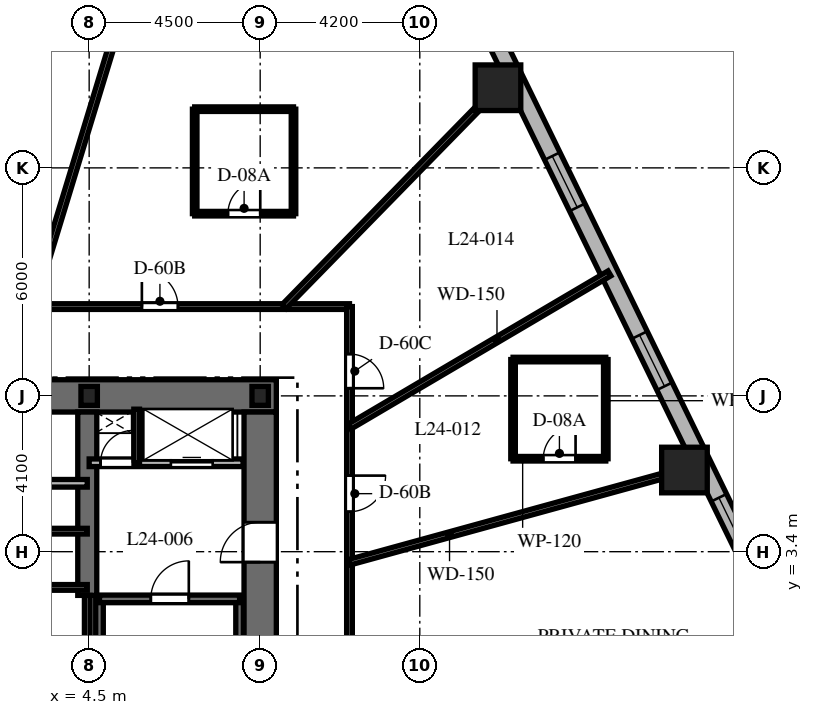
"""IFC4 building model, lengths in metres.
Left out: names, types, materials, properties, quantities, classifications, styles, units other than length and angle.
Written with IfcOpenShell. Run it as: python <this file> out.ifc"""

import sys

from ifc_helpers import new_model, si_unit, direction, frame, frame_2d, origin, origin_2d, place, context, subcontext, project, spatial, rectangle, i_section, extrude, element, fill, save


model = new_model("IFC4")
c1 = context("Model", 3, precision=1e-05, world=origin(), true_north=direction((0.0, 1.0)))
c2 = subcontext(c1, "Body", "Model", "MODEL_VIEW")
j1 = project(units=[si_unit("LENGTHUNIT", "METRE"), si_unit("PLANEANGLEUNIT", "RADIAN")], contexts=[c1])
p1 = place(None, origin())
s1 = spatial("IfcSite", under=j1, at=p1, CompositionType="ELEMENT")
p2 = place(p1, origin())
s2 = spatial("IfcBuilding", under=s1, at=p2, CompositionType="ELEMENT")
p3 = place(p2, frame((0.0, 0.0, 102.5)))
s3 = spatial("IfcBuildingStorey", under=s2, at=p3, CompositionType="ELEMENT", Elevation=102.5)
p4 = place(p3, frame((1.85, 7.5, 0.0), z_axis=(0.0, 0.0, 1.0), x_axis=(1.0, 0.0, 0.0)))
e1 = element("IfcWall", 1, at=p4, inside=s3, PredefinedType="SHEAR", context=c2, shape_type="SweptSolid", body=[
    extrude(rectangle(XDim=7.575, YDim=0.85, at=frame_2d((3.788, 0.0))), origin(), (0.0, 0.0, 1.0), 3.7),
])
p5 = place(p3, frame((9.0, -7.075, 0.0), z_axis=(0.0, 0.0, 1.0), x_axis=(0.0, 1.0, 0.0)))
e2 = element("IfcWall", 2, at=p5, inside=s3, PredefinedType="SHEAR", context=c2, shape_type="SweptSolid", body=[
    extrude(rectangle(XDim=14.15, YDim=0.85, at=frame_2d((7.075, 0.0))), origin(), (0.0, 0.0, 1.0), 3.7),
])
p6 = place(p5, frame((10.2, 0.0, 0.0)))
e3 = element("IfcOpeningElement", 3, at=p6, cuts=e2, PredefinedType="OPENING", context=c2, shape_type="SweptSolid", body=[
    extrude(rectangle(XDim=1.05, YDim=2.15, at=frame_2d((0.525, 1.075))), frame((0.0, 0.435, 0.0), z_axis=(0.0, -1.0, 0.0), x_axis=(1.0, 0.0, 0.0)), (0.0, 0.0, 1.0), 0.87),
])
p7 = place(p3, frame((4.45, 2.25, 0.0), z_axis=(0.0, 0.0, 1.0), x_axis=(0.0, 1.0, 0.0)))
e4 = element("IfcWall", 4, at=p7, inside=s3, PredefinedType="SHEAR", context=c2, shape_type="SweptSolid", body=[
    extrude(rectangle(XDim=4.825, YDim=0.5, at=frame_2d((2.413, 0.0))), origin(), (0.0, 0.0, 1.0), 3.7),
])
for number, where, z_axis, x_axis in (
    (5, (4.772, -6.985, 0.0), (0.0, 0.0, 1.0), (0.0, 1.0, 0.0)),
    (6, (8.458, -6.985, 0.0), (0.0, 0.0, 1.0), (0.0, 1.0, 0.0)),
):
    element("IfcWall", number, at=place(p3, frame(where, z_axis=z_axis, x_axis=x_axis)), inside=s3, PredefinedType="SHEAR", context=c2, shape_type="SweptSolid", body=[
        extrude(rectangle(XDim=9.143, YDim=0.2, at=frame_2d((4.572, 0.0))), origin(), (0.0, 0.0, 1.0), 3.7),
    ])
p8 = place(p3, frame((4.772, 2.158, 0.0), z_axis=(0.0, 0.0, 1.0), x_axis=(1.0, 0.0, 0.0)))
e7 = element("IfcWall", 7, at=p8, inside=s3, PredefinedType="SHEAR", context=c2, shape_type="SweptSolid", body=[
    extrude(rectangle(XDim=3.686, YDim=0.2, at=frame_2d((1.843, 0.0))), origin(), (0.0, 0.0, 1.0), 3.7),
])
p9 = place(p8, frame((1.35, 0.0, 0.0)))
e8 = element("IfcOpeningElement", 8, at=p9, cuts=e7, PredefinedType="OPENING", context=c2, shape_type="SweptSolid", body=[
    extrude(rectangle(XDim=1.0, YDim=2.15, at=frame_2d((0.5, 1.075))), frame((0.0, 0.11, 0.0), z_axis=(0.0, -1.0, 0.0), x_axis=(1.0, 0.0, 0.0)), (0.0, 0.0, 1.0), 0.22),
])
for number, where, z_axis, x_axis in (
    (9, (9.0, 7.5, 0.0), (0.0, 0.0, 1.0), (1.0, 0.0, 0.0)),
    (10, (4.5, 7.5, 0.0), (0.0, 0.0, 1.0), (1.0, 0.0, 0.0)),
):
    element("IfcColumn", number, at=place(p3, frame(where, z_axis=z_axis, x_axis=x_axis)), inside=s3, PredefinedType="COLUMN", context=c2, shape_type="SweptSolid", body=[
        extrude(i_section(OverallWidth=0.432, OverallDepth=0.498, WebThickness=0.056, FlangeThickness=0.089, at=origin_2d()), origin(), (0.0, 0.0, 1.0), 3.7),
    ])
for number, where, z_axis, x_axis in (
    (11, (20.164, 5.549, 0.0), (0.0, 0.0, 1.0), (1.0, 0.0, 0.0)),
    (12, (15.257, 15.609, 0.0), (0.0, 0.0, 1.0), (1.0, 0.0, 0.0)),
):
    element("IfcColumn", number, at=place(p3, frame(where, z_axis=z_axis, x_axis=x_axis)), inside=s3, PredefinedType="COLUMN", context=c2, shape_type="SweptSolid", body=[
        extrude(rectangle(XDim=1.2, YDim=1.2, at=origin_2d()), origin(), (0.0, 0.0, 1.0), 3.7),
    ])
p10 = place(p3, frame((22.238, 2.427, 0.0), z_axis=(0.0, 0.0, 1.0), x_axis=(-0.438374803278, 0.898792262901, 0.0)))
e13 = element("IfcWall", 13, at=p10, inside=s3, PredefinedType="SOLIDWALL", context=c2, shape_type="SweptSolid", body=[
    extrude(rectangle(XDim=18.618, YDim=0.45, at=frame_2d((9.309, 0.0))), origin(), (0.0, 0.0, 1.0), 3.4),
])
p11 = place(p10, frame((5.926, 0.0, 0.8)))
e14 = element("IfcOpeningElement", 14, at=p11, cuts=e13, PredefinedType="OPENING", context=c2, shape_type="SweptSolid", body=[
    extrude(rectangle(XDim=1.5, YDim=1.8, at=frame_2d((0.75, 0.9))), frame((0.0, 0.235, 0.0), z_axis=(0.0, -1.0, 0.0), x_axis=(1.0, 0.0, 0.0)), (0.0, 0.0, 1.0), 0.47),
])
p12 = place(p10, frame((11.165, 0.0, 0.8)))
e15 = element("IfcOpeningElement", 15, at=p12, cuts=e13, PredefinedType="OPENING", context=c2, shape_type="SweptSolid", body=[
    extrude(rectangle(XDim=1.5, YDim=1.8, at=frame_2d((0.75, 0.9))), frame((0.0, 0.235, 0.0), z_axis=(0.0, -1.0, 0.0), x_axis=(1.0, 0.0, 0.0)), (0.0, 0.0, 1.0), 0.47),
])
p13 = place(p10, frame((16.006, 0.0, 0.8)))
e16 = element("IfcOpeningElement", 16, at=p13, cuts=e13, PredefinedType="OPENING", context=c2, shape_type="SweptSolid", body=[
    extrude(rectangle(XDim=1.5, YDim=1.8, at=frame_2d((0.75, 0.9))), frame((0.0, 0.235, 0.0), z_axis=(0.0, -1.0, 0.0), x_axis=(1.0, 0.0, 0.0)), (0.0, 0.0, 1.0), 0.47),
])
p14 = place(p10, frame((1.163, 0.0, 0.8)))
e17 = element("IfcOpeningElement", 17, at=p14, cuts=e13, PredefinedType="OPENING", context=c2, shape_type="SweptSolid", body=[
    extrude(rectangle(XDim=1.5, YDim=1.8, at=frame_2d((0.75, 0.9))), frame((0.0, 0.235, 0.0), z_axis=(0.0, -1.0, 0.0), x_axis=(1.0, 0.0, 0.0)), (0.0, 0.0, 1.0), 0.47),
])
p15 = place(p3, frame((4.5, 5.74, 0.0), z_axis=(0.0, 0.0, 1.0), x_axis=(1.0, 0.0, 0.0)))
e18 = element("IfcWall", 18, at=p15, inside=s3, PredefinedType="PARTITIONING", context=c2, shape_type="SweptSolid", body=[
    extrude(rectangle(XDim=4.05, YDim=0.2, at=frame_2d((2.025, 0.0))), origin(), (0.0, 0.0, 1.0), 3.4),
])
p16 = place(p15, frame((0.3, 0.0, 0.0)))
e19 = element("IfcOpeningElement", 19, at=p16, cuts=e18, PredefinedType="OPENING", context=c2, shape_type="SweptSolid", body=[
    extrude(rectangle(XDim=0.85, YDim=2.03, at=frame_2d((0.425, 1.015))), frame((0.0, 0.11, 0.0), z_axis=(0.0, -1.0, 0.0), x_axis=(1.0, 0.0, 0.0)), (0.0, 0.0, 1.0), 0.22),
])
p17 = place(p15, frame((2.15, 0.0, 0.0)))
e20 = element("IfcOpeningElement", 20, at=p17, cuts=e18, PredefinedType="OPENING", context=c2, shape_type="SweptSolid", body=[
    extrude(rectangle(XDim=1.1, YDim=2.2, at=frame_2d((0.55, 1.1))), frame((0.0, 0.11, 0.0), z_axis=(0.0, -1.0, 0.0), x_axis=(1.0, 0.0, 0.0)), (0.0, 0.0, 1.0), 0.22),
])
p18 = place(p3, frame((5.75, 5.74, 0.0), z_axis=(0.0, 0.0, 1.0), x_axis=(0.0, 1.0, 0.0)))
e21 = element("IfcWall", 21, at=p18, inside=s3, PredefinedType="PARTITIONING", context=c2, shape_type="SweptSolid", body=[
    extrude(rectangle(XDim=1.41, YDim=0.15, at=frame_2d((0.705, 0.0))), origin(), (0.0, 0.0, 1.0), 3.4),
])
p19 = place(p3, frame((1.85, 5.2, 0.0), z_axis=(0.0, 0.0, 1.0), x_axis=(1.0, 0.0, 0.0)))
e22 = element("IfcWall", 22, at=p19, inside=s3, PredefinedType="PARTITIONING", context=c2, shape_type="SweptSolid", body=[
    extrude(rectangle(XDim=2.6, YDim=0.2, at=frame_2d((1.3, 0.0))), origin(), (0.0, 0.0, 1.0), 3.4),
])
p20 = place(p3, frame((4.45, -1.972, 0.0), z_axis=(0.0, 0.0, 1.0), x_axis=(0.0, 1.0, 0.0)))
e23 = element("IfcWall", 23, at=p20, inside=s3, PredefinedType="PARTITIONING", context=c2, shape_type="SweptSolid", body=[
    extrude(rectangle(XDim=4.222, YDim=0.15, at=frame_2d((2.111, 0.0))), origin(), (0.0, 0.0, 1.0), 3.4),
])
for number, where, z_axis, x_axis in (
    (24, (1.9, 3.94, 0.0), (0.0, 0.0, 1.0), (1.0, 0.0, 0.0)),
    (25, (1.9, 2.46, 0.0), (0.0, 0.0, 1.0), (1.0, 0.0, 0.0)),
):
    element("IfcWall", number, at=place(p3, frame(where, z_axis=z_axis, x_axis=x_axis)), inside=s3, PredefinedType="PARTITIONING", context=c2, shape_type="SweptSolid", body=[
        extrude(rectangle(XDim=2.55, YDim=0.15, at=frame_2d((1.275, 0.0))), origin(), (0.0, 0.0, 1.0), 3.4),
    ])
p21 = place(p3, frame((-11.35, 9.85, 0.0), z_axis=(0.0, 0.0, 1.0), x_axis=(1.0, 0.0, 0.0)))
e26 = element("IfcWall", 26, at=p21, inside=s3, PredefinedType="PARTITIONING", context=c2, shape_type="SweptSolid", body=[
    extrude(rectangle(XDim=22.7, YDim=0.15, at=frame_2d((11.35, 0.0))), origin(), (0.0, 0.0, 1.0), 2.84),
])
p22 = place(p21, frame((17.237, 0.0, 0.0)))
e27 = element("IfcOpeningElement", 27, at=p22, cuts=e26, PredefinedType="OPENING", context=c2, shape_type="SweptSolid", body=[
    extrude(rectangle(XDim=0.95, YDim=2.03, at=frame_2d((0.475, 1.015))), frame((0.0, 0.085, 0.0), z_axis=(0.0, -1.0, 0.0), x_axis=(1.0, 0.0, 0.0)), (0.0, 0.0, 1.0), 0.17),
])
p23 = place(p21, frame((10.45, 0.0, 0.0)))
e28 = element("IfcOpeningElement", 28, at=p23, cuts=e26, PredefinedType="OPENING", context=c2, shape_type="SweptSolid", body=[
    extrude(rectangle(XDim=0.95, YDim=2.03, at=frame_2d((0.475, 1.015))), frame((0.0, 0.085, 0.0), z_axis=(0.0, -1.0, 0.0), x_axis=(1.0, 0.0, 0.0)), (0.0, 0.0, 1.0), 0.17),
])
p24 = place(p21, frame((3.399, 0.0, 0.0)))
e29 = element("IfcOpeningElement", 29, at=p24, cuts=e26, PredefinedType="OPENING", context=c2, shape_type="SweptSolid", body=[
    extrude(rectangle(XDim=0.95, YDim=2.03, at=frame_2d((0.475, 1.015))), frame((0.0, 0.085, 0.0), z_axis=(0.0, -1.0, 0.0), x_axis=(1.0, 0.0, 0.0)), (0.0, 0.0, 1.0), 0.17),
])
p25 = place(p3, frame((11.35, 9.85, 0.0), z_axis=(0.0, 0.0, 1.0), x_axis=(0.0, -1.0, 0.0)))
e30 = element("IfcWall", 30, at=p25, inside=s3, PredefinedType="PARTITIONING", context=c2, shape_type="SweptSolid", body=[
    extrude(rectangle(XDim=19.7, YDim=0.15, at=frame_2d((9.85, 0.0))), origin(), (0.0, 0.0, 1.0), 2.84),
])
p26 = place(p25, frame((4.448, 0.0, 0.0)))
e31 = element("IfcOpeningElement", 31, at=p26, cuts=e30, PredefinedType="OPENING", context=c2, shape_type="SweptSolid", body=[
    extrude(rectangle(XDim=0.95, YDim=2.03, at=frame_2d((0.475, 1.015))), frame((0.0, 0.085, 0.0), z_axis=(0.0, -1.0, 0.0), x_axis=(1.0, 0.0, 0.0)), (0.0, 0.0, 1.0), 0.17),
])
p27 = place(p25, frame((1.249, 0.0, 0.0)))
e32 = element("IfcOpeningElement", 32, at=p27, cuts=e30, PredefinedType="OPENING", context=c2, shape_type="SweptSolid", body=[
    extrude(rectangle(XDim=0.9, YDim=2.03, at=frame_2d((0.45, 1.015))), frame((0.0, 0.085, 0.0), z_axis=(0.0, -1.0, 0.0), x_axis=(1.0, 0.0, 0.0)), (0.0, 0.0, 1.0), 0.17),
])
p28 = place(p25, frame((15.205, 0.0, 0.0)))
e33 = element("IfcOpeningElement", 33, at=p28, cuts=e30, PredefinedType="OPENING", context=c2, shape_type="SweptSolid", body=[
    extrude(rectangle(XDim=0.95, YDim=2.03, at=frame_2d((0.475, 1.015))), frame((0.0, 0.085, 0.0), z_axis=(0.0, -1.0, 0.0), x_axis=(1.0, 0.0, 0.0)), (0.0, 0.0, 1.0), 0.17),
])
p29 = place(p25, frame((8.836, 0.0, 0.0)))
e34 = element("IfcOpeningElement", 34, at=p29, cuts=e30, PredefinedType="OPENING", context=c2, shape_type="SweptSolid", body=[
    extrude(rectangle(XDim=0.95, YDim=2.03, at=frame_2d((0.475, 1.015))), frame((0.0, 0.085, 0.0), z_axis=(0.0, -1.0, 0.0), x_axis=(1.0, 0.0, 0.0)), (0.0, 0.0, 1.0), 0.17),
])
p30 = place(p3, frame((11.35, 3.123, 0.0), z_axis=(0.0, 0.0, 1.0), x_axis=(0.964151983214, 0.265350623261, 0.0)))
e35 = element("IfcWall", 35, at=p30, inside=s3, PredefinedType="PARTITIONING", context=c2, shape_type="SweptSolid", body=[
    extrude(rectangle(XDim=9.645, YDim=0.15, at=frame_2d((4.823, 0.0))), origin(), (0.0, 0.0, 1.0), 2.54),
])
p31 = place(p3, frame((11.35, 6.691, 0.0), z_axis=(0.0, 0.0, 1.0), x_axis=(0.861446954497, 0.507847560383, 0.0)))
e36 = element("IfcWall", 36, at=p31, inside=s3, PredefinedType="PARTITIONING", context=c2, shape_type="SweptSolid", body=[
    extrude(rectangle(XDim=7.941, YDim=0.15, at=frame_2d((3.97, 0.0))), origin(), (0.0, 0.0, 1.0), 2.54),
])
p32 = place(p3, frame((9.628, 9.85, 0.0), z_axis=(0.0, 0.0, 1.0), x_axis=(0.698992824326, 0.715128681805, 0.0)))
e37 = element("IfcWall", 37, at=p32, inside=s3, PredefinedType="PARTITIONING", context=c2, shape_type="SweptSolid", body=[
    extrude(rectangle(XDim=8.579, YDim=0.15, at=frame_2d((4.29, 0.0))), origin(), (0.0, 0.0, 1.0), 2.54),
])
p33 = place(p3, frame((3.0, 9.85, 0.0), z_axis=(0.0, 0.0, 1.0), x_axis=(0.291352035382, 0.95661590593, 0.0)))
e38 = element("IfcWall", 38, at=p33, inside=s3, PredefinedType="PARTITIONING", context=c2, shape_type="SweptSolid", body=[
    extrude(rectangle(XDim=11.734, YDim=0.15, at=frame_2d((5.867, 0.0))), origin(), (0.0, 0.0, 1.0), 2.54),
])
p34 = place(p3, frame((15.654, 5.846, 0.0), z_axis=(0.0, 0.0, 1.0), x_axis=(1.0, 0.0, 0.0)))
e39 = element("IfcWall", 39, at=p34, inside=s3, PredefinedType="PARTITIONING", context=c2, shape_type="SweptSolid", body=[
    extrude(rectangle(XDim=2.44, YDim=0.12, at=frame_2d((1.22, 0.0))), origin(), (0.0, 0.0, 1.0), 2.84),
])
p35 = place(p34, frame((0.795, 0.0, 0.0)))
e40 = element("IfcOpeningElement", 40, at=p35, cuts=e39, PredefinedType="OPENING", context=c2, shape_type="SweptSolid", body=[
    extrude(rectangle(XDim=0.85, YDim=2.03, at=frame_2d((0.425, 1.015))), frame((0.0, 0.07, 0.0), z_axis=(0.0, -1.0, 0.0), x_axis=(1.0, 0.0, 0.0)), (0.0, 0.0, 1.0), 0.14),
])
p36 = place(p3, frame((18.094, 5.846, 0.0), z_axis=(0.0, 0.0, 1.0), x_axis=(0.0, 1.0, 0.0)))
e41 = element("IfcWall", 41, at=p36, inside=s3, PredefinedType="PARTITIONING", context=c2, shape_type="SweptSolid", body=[
    extrude(rectangle(XDim=2.61, YDim=0.12, at=frame_2d((1.305, 0.0))), origin(), (0.0, 0.0, 1.0), 2.84),
])
p37 = place(p3, frame((18.094, 8.456, 0.0), z_axis=(0.0, 0.0, 1.0), x_axis=(-1.0, 0.0, 0.0)))
e42 = element("IfcWall", 42, at=p37, inside=s3, PredefinedType="PARTITIONING", context=c2, shape_type="SweptSolid", body=[
    extrude(rectangle(XDim=2.44, YDim=0.12, at=frame_2d((1.22, 0.0))), origin(), (0.0, 0.0, 1.0), 3.4),
])
p38 = place(p3, frame((15.654, 8.456, 0.0), z_axis=(0.0, 0.0, 1.0), x_axis=(0.0, -1.0, 0.0)))
e43 = element("IfcWall", 43, at=p38, inside=s3, PredefinedType="PARTITIONING", context=c2, shape_type="SweptSolid", body=[
    extrude(rectangle(XDim=2.61, YDim=0.12, at=frame_2d((1.305, 0.0))), origin(), (0.0, 0.0, 1.0), 2.84),
])
p39 = place(p3, frame((7.277, 12.295, 0.0), z_axis=(0.0, 0.0, 1.0), x_axis=(1.0, 0.0, 0.0)))
e44 = element("IfcWall", 44, at=p39, inside=s3, PredefinedType="PARTITIONING", context=c2, shape_type="SweptSolid", body=[
    extrude(rectangle(XDim=2.6, YDim=0.12, at=frame_2d((1.3, 0.0))), origin(), (0.0, 0.0, 1.0), 2.84),
])
p40 = place(p39, frame((0.875, 0.0, 0.0)))
e45 = element("IfcOpeningElement", 45, at=p40, cuts=e44, PredefinedType="OPENING", context=c2, shape_type="SweptSolid", body=[
    extrude(rectangle(XDim=0.85, YDim=2.03, at=frame_2d((0.425, 1.015))), frame((0.0, 0.07, 0.0), z_axis=(0.0, -1.0, 0.0), x_axis=(1.0, 0.0, 0.0)), (0.0, 0.0, 1.0), 0.14),
])
p41 = place(p3, frame((9.877, 12.295, 0.0), z_axis=(0.0, 0.0, 1.0), x_axis=(0.0, 1.0, 0.0)))
e46 = element("IfcWall", 46, at=p41, inside=s3, PredefinedType="PARTITIONING", context=c2, shape_type="SweptSolid", body=[
    extrude(rectangle(XDim=2.75, YDim=0.12, at=frame_2d((1.375, 0.0))), origin(), (0.0, 0.0, 1.0), 2.972),
])
p42 = place(p3, frame((9.877, 15.045, 0.0), z_axis=(0.0, 0.0, 1.0), x_axis=(-1.0, 0.0, 0.0)))
e47 = element("IfcWall", 47, at=p42, inside=s3, PredefinedType="PARTITIONING", context=c2, shape_type="SweptSolid", body=[
    extrude(rectangle(XDim=2.6, YDim=0.12, at=frame_2d((1.3, 0.0))), origin(), (0.0, 0.0, 1.0), 2.972),
])
p43 = place(p3, frame((7.277, 15.045, 0.0), z_axis=(0.0, 0.0, 1.0), x_axis=(0.0, -1.0, 0.0)))
e48 = element("IfcWall", 48, at=p43, inside=s3, PredefinedType="PARTITIONING", context=c2, shape_type="SweptSolid", body=[
    extrude(rectangle(XDim=2.75, YDim=0.12, at=frame_2d((1.375, 0.0))), origin(), (0.0, 0.0, 1.0), 2.84),
])
p44 = place(p11, origin())
e49 = element("IfcWindow", 49, at=p44, inside=s3, PartitioningType="SINGLE_PANEL", PredefinedType="WINDOW", context=c2, shape_type="SweptSolid", body=[
    extrude(rectangle(XDim=1.5, YDim=1.8, at=frame_2d((0.75, 0.9))), frame((0.0, 0.03, 0.0), z_axis=(0.0, -1.0, 0.0), x_axis=(1.0, 0.0, 0.0)), (0.0, 0.0, 1.0), 0.06),
])
fill(e14, e49)
p45 = place(p12, origin())
e50 = element("IfcWindow", 50, at=p45, inside=s3, PartitioningType="SINGLE_PANEL", PredefinedType="WINDOW", context=c2, shape_type="SweptSolid", body=[
    extrude(rectangle(XDim=1.5, YDim=1.8, at=frame_2d((0.75, 0.9))), frame((0.0, 0.03, 0.0), z_axis=(0.0, -1.0, 0.0), x_axis=(1.0, 0.0, 0.0)), (0.0, 0.0, 1.0), 0.06),
])
fill(e15, e50)
p46 = place(p14, origin())
e51 = element("IfcWindow", 51, at=p46, inside=s3, PartitioningType="SINGLE_PANEL", PredefinedType="WINDOW", context=c2, shape_type="SweptSolid", body=[
    extrude(rectangle(XDim=1.5, YDim=1.8, at=frame_2d((0.75, 0.9))), frame((0.0, 0.03, 0.0), z_axis=(0.0, -1.0, 0.0), x_axis=(1.0, 0.0, 0.0)), (0.0, 0.0, 1.0), 0.06),
])
fill(e17, e51)
p47 = place(p9, origin())
e52 = element("IfcDoor", 52, at=p47, inside=s3, OperationType="SINGLE_SWING_RIGHT", PredefinedType="DOOR", context=c2, shape_type="SweptSolid", body=[
    extrude(rectangle(XDim=1.0, YDim=2.15, at=frame_2d((0.5, 1.075))), frame((0.0, 0.025, 0.0), z_axis=(0.0, -1.0, 0.0), x_axis=(1.0, 0.0, 0.0)), (0.0, 0.0, 1.0), 0.05),
])
fill(e8, e52)
p48 = place(p6, origin())
e53 = element("IfcDoor", 53, at=p48, inside=s3, OperationType="SINGLE_SWING_LEFT", PredefinedType="DOOR", context=c2, shape_type="SweptSolid", body=[
    extrude(rectangle(XDim=1.05, YDim=2.15, at=frame_2d((0.525, 1.075))), frame((0.0, 0.025, 0.0), z_axis=(0.0, -1.0, 0.0), x_axis=(1.0, 0.0, 0.0)), (0.0, 0.0, 1.0), 0.05),
])
fill(e3, e53)
p49 = place(p16, origin())
e54 = element("IfcDoor", 54, at=p49, inside=s3, OperationType="SINGLE_SWING_RIGHT", PredefinedType="DOOR", context=c2, shape_type="SweptSolid", body=[
    extrude(rectangle(XDim=0.85, YDim=2.03, at=frame_2d((0.425, 1.015))), frame((0.0, 0.025, 0.0), z_axis=(0.0, -1.0, 0.0), x_axis=(1.0, 0.0, 0.0)), (0.0, 0.0, 1.0), 0.05),
])
fill(e19, e54)
p50 = place(p17, origin())
e55 = element("IfcDoor", 55, at=p50, inside=s3, OperationType="SLIDING_TO_RIGHT", PredefinedType="DOOR", context=c2, shape_type="SweptSolid", body=[
    extrude(rectangle(XDim=1.1, YDim=2.2, at=frame_2d((0.55, 1.1))), frame((0.0, 0.025, 0.0), z_axis=(0.0, -1.0, 0.0), x_axis=(1.0, 0.0, 0.0)), (0.0, 0.0, 1.0), 0.05),
])
fill(e20, e55)
p51 = place(p26, origin())
e56 = element("IfcDoor", 56, at=p51, inside=s3, OperationType="SINGLE_SWING_LEFT", PredefinedType="DOOR", context=c2, shape_type="SweptSolid", body=[
    extrude(rectangle(XDim=0.95, YDim=2.03, at=frame_2d((0.475, 1.015))), frame((0.0, 0.025, 0.0), z_axis=(0.0, -1.0, 0.0), x_axis=(1.0, 0.0, 0.0)), (0.0, 0.0, 1.0), 0.05),
])
fill(e31, e56)
p52 = place(p35, origin())
e57 = element("IfcDoor", 57, at=p52, inside=s3, OperationType="SINGLE_SWING_RIGHT", PredefinedType="DOOR", context=c2, shape_type="SweptSolid", body=[
    extrude(rectangle(XDim=0.85, YDim=2.03, at=frame_2d((0.425, 1.015))), frame((0.0, 0.025, 0.0), z_axis=(0.0, -1.0, 0.0), x_axis=(1.0, 0.0, 0.0)), (0.0, 0.0, 1.0), 0.05),
])
fill(e40, e57)
p53 = place(p27, origin())
e58 = element("IfcDoor", 58, at=p53, inside=s3, OperationType="SINGLE_SWING_RIGHT", PredefinedType="DOOR", context=c2, shape_type="SweptSolid", body=[
    extrude(rectangle(XDim=0.9, YDim=2.03, at=frame_2d((0.45, 1.015))), frame((0.0, 0.025, 0.0), z_axis=(0.0, -1.0, 0.0), x_axis=(1.0, 0.0, 0.0)), (0.0, 0.0, 1.0), 0.05),
])
fill(e32, e58)
p54 = place(p22, origin())
e59 = element("IfcDoor", 59, at=p54, inside=s3, OperationType="SINGLE_SWING_LEFT", PredefinedType="DOOR", context=c2, shape_type="SweptSolid", body=[
    extrude(rectangle(XDim=0.95, YDim=2.03, at=frame_2d((0.475, 1.015))), frame((0.0, 0.025, 0.0), z_axis=(0.0, -1.0, 0.0), x_axis=(1.0, 0.0, 0.0)), (0.0, 0.0, 1.0), 0.05),
])
fill(e27, e59)
p55 = place(p40, origin())
e60 = element("IfcDoor", 60, at=p55, inside=s3, OperationType="SINGLE_SWING_RIGHT", PredefinedType="DOOR", context=c2, shape_type="SweptSolid", body=[
    extrude(rectangle(XDim=0.85, YDim=2.03, at=frame_2d((0.425, 1.015))), frame((0.0, 0.025, 0.0), z_axis=(0.0, -1.0, 0.0), x_axis=(1.0, 0.0, 0.0)), (0.0, 0.0, 1.0), 0.05),
])
fill(e45, e60)
save(model, sys.argv[1])
